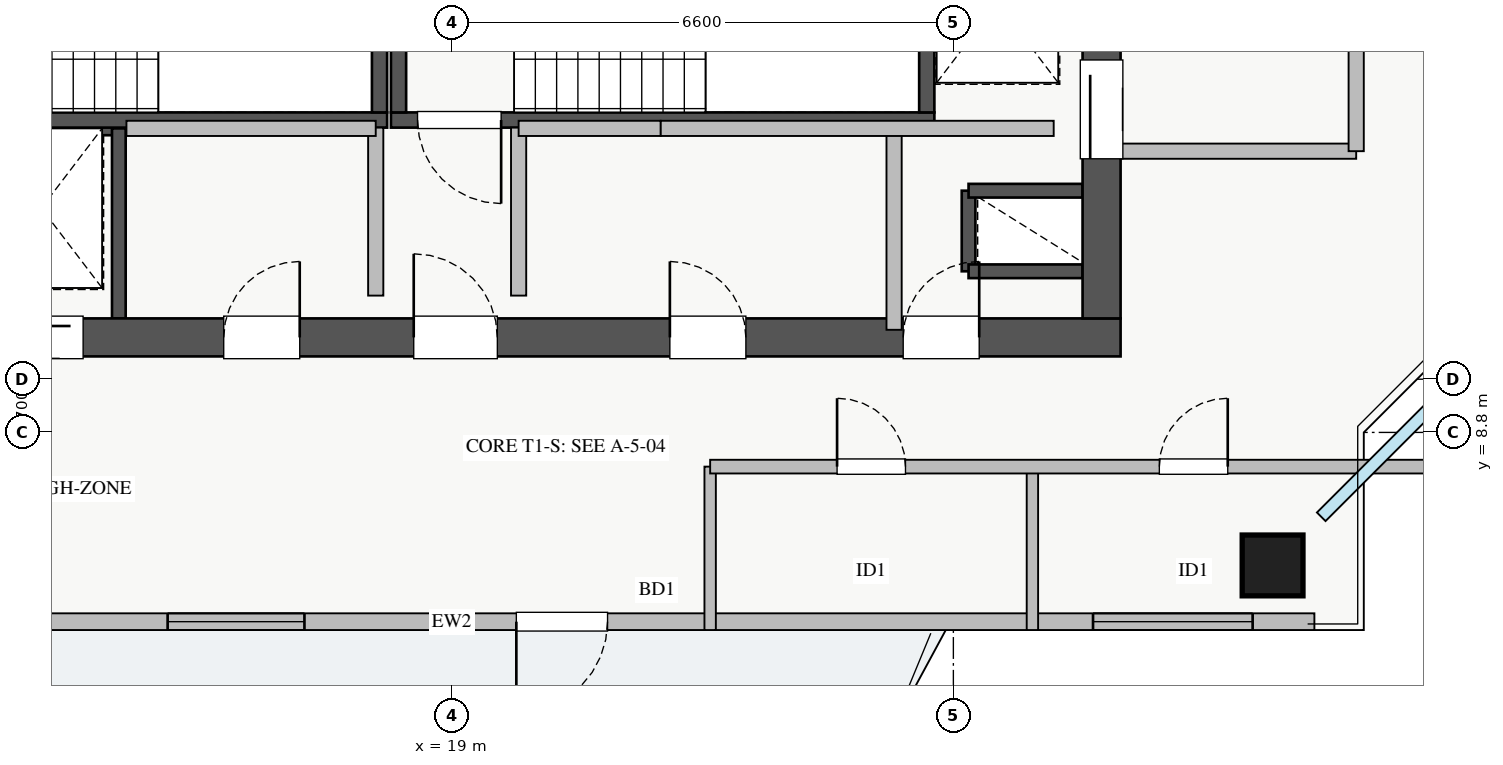
"""IFC4 building model, lengths in metres.
Left out: names, types, materials, properties, quantities, classifications, styles, units other than length and angle.
Written with IfcOpenShell. Run it as: python <this file> out.ifc"""

import sys

from ifc_helpers import new_model, si_unit, direction, frame, frame_2d, origin, origin_2d, place, context, subcontext, project, spatial, rectangle, extrude, source, transform, mapped, element, fill, save


model = new_model("IFC4")
c1 = context("Model", 3, precision=1e-05, world=origin(), true_north=direction((0.0, 1.0)))
c2 = subcontext(c1, "Body", "Model", "MODEL_VIEW")
j1 = project(units=[si_unit("LENGTHUNIT", "METRE"), si_unit("PLANEANGLEUNIT", "RADIAN")], contexts=[c1])
p1 = place(None, origin())
s1 = spatial("IfcSite", under=j1, at=p1, CompositionType="ELEMENT")
p2 = place(p1, origin())
s2 = spatial("IfcBuilding", under=s1, at=p2, CompositionType="ELEMENT")
p3 = place(p2, frame((0.0, 0.0, 206.75)))
s3 = spatial("IfcBuildingStorey", under=s2, at=p3, CompositionType="ELEMENT", Elevation=206.75)
p4 = place(p3, frame((12.68, 12.8, 0.0), z_axis=(0.0, 0.0, 1.0), x_axis=(1.0, 0.0, 0.0)))
e1 = element("IfcWall", 1, at=p4, inside=s3, PredefinedType="SHEAR", context=c2, shape_type="SweptSolid", body=[
    extrude(rectangle(XDim=1.94, YDim=0.18, at=frame_2d((0.97, 0.0))), origin(), (0.0, 0.0, 1.0), 3.07),
])
p5 = place(p3, frame((14.62, 10.3, 0.0), z_axis=(0.0, 0.0, 1.0), x_axis=(0.0, 1.0, 0.0)))
e2 = element("IfcWall", 2, at=p5, inside=s3, PredefinedType="SHEAR", context=c2, shape_type="SweptSolid", body=[
    extrude(rectangle(XDim=2.5, YDim=0.18, at=frame_2d((1.25, 0.0))), origin(), (0.0, 0.0, 1.0), 3.07),
])
p6 = place(p3, frame((25.8, 10.92, 0.0), z_axis=(0.0, 0.0, 1.0), x_axis=(0.0, 1.0, 0.0)))
e3 = element("IfcWall", 3, at=p6, inside=s3, PredefinedType="SHEAR", context=c2, shape_type="SweptSolid", body=[
    extrude(rectangle(XDim=1.06, YDim=0.18, at=frame_2d((0.53, 0.0))), origin(), (0.0, 0.0, 1.0), 3.07),
])
for number, where, z_axis, x_axis in (
    (4, (25.8, 11.98, 0.0), (0.0, 0.0, 1.0), (1.0, 0.0, 0.0)),
    (5, (25.8, 10.92, 0.0), (0.0, 0.0, 1.0), (1.0, 0.0, 0.0)),
):
    element("IfcWall", number, at=place(p3, frame(where, z_axis=z_axis, x_axis=x_axis)), inside=s3, PredefinedType="SHEAR", context=c2, shape_type="SweptSolid", body=[
        extrude(rectangle(XDim=1.5, YDim=0.18, at=frame_2d((0.75, 0.0))), origin(), (0.0, 0.0, 1.0), 3.07),
    ])
p7 = place(p3, frame((10.7, 12.91, 0.0), z_axis=(0.0, 0.0, 1.0), x_axis=(1.0, 0.0, 0.0)))
e6 = element("IfcWall", 6, at=p7, inside=s3, PredefinedType="SHEAR", context=c2, shape_type="SweptSolid", body=[
    extrude(rectangle(XDim=7.45, YDim=0.2, at=frame_2d((3.725, 0.0))), origin(), (0.0, 0.0, 1.0), 3.25),
])
p8 = place(p7, frame((0.35, 0.0, 0.0)))
e7 = element("IfcOpeningElement", 7, at=p8, cuts=e6, PredefinedType="OPENING", context=c2, shape_type="SweptSolid", body=[
    extrude(rectangle(XDim=1.1, YDim=2.05, at=frame_2d((0.55, 1.025))), frame((0.0, 0.11, 0.0), z_axis=(0.0, -1.0, 0.0), x_axis=(1.0, 0.0, 0.0)), (0.0, 0.0, 1.0), 0.22),
])
p9 = place(p3, frame((18.05, 13.01, 0.0), z_axis=(0.0, 0.0, 1.0), x_axis=(0.0, 1.0, 0.0)))
e8 = element("IfcWall", 8, at=p9, inside=s3, PredefinedType="SHEAR", context=c2, shape_type="SweptSolid", body=[
    extrude(rectangle(XDim=2.94, YDim=0.2, at=frame_2d((1.47, 0.0))), origin(), (0.0, 0.0, 1.0), 3.25),
])
p10 = place(p3, frame((18.2, 12.91, 0.0), z_axis=(0.0, 0.0, 1.0), x_axis=(1.0, 0.0, 0.0)))
e9 = element("IfcWall", 9, at=p10, inside=s3, PredefinedType="SHEAR", context=c2, shape_type="SweptSolid", body=[
    extrude(rectangle(XDim=7.15, YDim=0.2, at=frame_2d((3.575, 0.0))), origin(), (0.0, 0.0, 1.0), 3.25),
])
p11 = place(p10, frame((0.35, 0.0, 0.0)))
e10 = element("IfcOpeningElement", 10, at=p11, cuts=e9, PredefinedType="OPENING", context=c2, shape_type="SweptSolid", body=[
    extrude(rectangle(XDim=1.1, YDim=2.05, at=frame_2d((0.55, 1.025))), frame((0.0, 0.11, 0.0), z_axis=(0.0, -1.0, 0.0), x_axis=(1.0, 0.0, 0.0)), (0.0, 0.0, 1.0), 0.22),
])
for number, where, z_axis, x_axis in (
    (11, (18.3, 13.01, 0.0), (0.0, 0.0, 1.0), (0.0, 1.0, 0.0)),
    (12, (25.25, 13.01, 0.0), (0.0, 0.0, 1.0), (0.0, 1.0, 0.0)),
):
    element("IfcWall", number, at=place(p3, frame(where, z_axis=z_axis, x_axis=x_axis)), inside=s3, PredefinedType="SHEAR", context=c2, shape_type="SweptSolid", body=[
        extrude(rectangle(XDim=2.94, YDim=0.2, at=frame_2d((1.47, 0.0))), origin(), (0.0, 0.0, 1.0), 3.25),
    ])
p12 = place(p3, frame((10.2, 10.05, 0.0), z_axis=(0.0, 0.0, 1.0), x_axis=(1.0, 0.0, 0.0)))
e13 = element("IfcWall", 13, at=p12, inside=s3, PredefinedType="SHEAR", context=c2, shape_type="SweptSolid", body=[
    extrude(rectangle(XDim=17.6, YDim=0.5, at=frame_2d((8.8, 0.0))), origin(), (0.0, 0.0, 1.0), 3.25),
])
p13 = place(p12, frame((1.15, 0.0, 0.0)))
e14 = element("IfcOpeningElement", 14, at=p13, cuts=e13, PredefinedType="OPENING", context=c2, shape_type="SweptSolid", body=[
    extrude(rectangle(XDim=1.1, YDim=2.05, at=frame_2d((0.55, 1.025))), frame((0.0, 0.26, 0.0), z_axis=(0.0, -1.0, 0.0), x_axis=(1.0, 0.0, 0.0)), (0.0, 0.0, 1.0), 0.52),
])
p14 = place(p12, frame((8.3, 0.0, 0.0)))
e15 = element("IfcOpeningElement", 15, at=p14, cuts=e13, PredefinedType="OPENING", context=c2, shape_type="SweptSolid", body=[
    extrude(rectangle(XDim=1.1, YDim=2.05, at=frame_2d((0.55, 1.025))), frame((0.0, 0.26, 0.0), z_axis=(0.0, -1.0, 0.0), x_axis=(1.0, 0.0, 0.0)), (0.0, 0.0, 1.0), 0.52),
])
p15 = place(p12, frame((2.85, 0.0, 0.0)))
e16 = element("IfcOpeningElement", 16, at=p15, cuts=e13, PredefinedType="OPENING", context=c2, shape_type="SweptSolid", body=[
    extrude(rectangle(XDim=1.1, YDim=2.05, at=frame_2d((0.55, 1.025))), frame((0.0, 0.26, 0.0), z_axis=(0.0, -1.0, 0.0), x_axis=(1.0, 0.0, 0.0)), (0.0, 0.0, 1.0), 0.52),
])
p16 = place(p12, frame((5.8, 0.0, 0.0)))
e17 = element("IfcOpeningElement", 17, at=p16, cuts=e13, PredefinedType="OPENING", context=c2, shape_type="SweptSolid", body=[
    extrude(rectangle(XDim=1.0, YDim=2.05, at=frame_2d((0.5, 1.025))), frame((0.0, 0.26, 0.0), z_axis=(0.0, -1.0, 0.0), x_axis=(1.0, 0.0, 0.0)), (0.0, 0.0, 1.0), 0.52),
])
p17 = place(p12, frame((14.74, 0.0, 0.0)))
e18 = element("IfcOpeningElement", 18, at=p17, cuts=e13, PredefinedType="OPENING", context=c2, shape_type="SweptSolid", body=[
    extrude(rectangle(XDim=1.0, YDim=2.05, at=frame_2d((0.5, 1.025))), frame((0.0, 0.26, 0.0), z_axis=(0.0, -1.0, 0.0), x_axis=(1.0, 0.0, 0.0)), (0.0, 0.0, 1.0), 0.52),
])
p18 = place(p12, frame((11.67, 0.0, 0.0)))
e19 = element("IfcOpeningElement", 19, at=p18, cuts=e13, PredefinedType="OPENING", context=c2, shape_type="SweptSolid", body=[
    extrude(rectangle(XDim=1.0, YDim=2.05, at=frame_2d((0.5, 1.025))), frame((0.0, 0.26, 0.0), z_axis=(0.0, -1.0, 0.0), x_axis=(1.0, 0.0, 0.0)), (0.0, 0.0, 1.0), 0.52),
])
p19 = place(p3, frame((27.55, 10.3, 0.0), z_axis=(0.0, 0.0, 1.0), x_axis=(0.0, 1.0, 0.0)))
e20 = element("IfcWall", 20, at=p19, inside=s3, PredefinedType="SHEAR", context=c2, shape_type="SweptSolid", body=[
    extrude(rectangle(XDim=6.2, YDim=0.5, at=frame_2d((3.1, 0.0))), origin(), (0.0, 0.0, 1.0), 3.25),
])
p20 = place(p19, frame((2.1, 0.0, 0.0)))
e21 = element("IfcOpeningElement", 21, at=p20, cuts=e20, PredefinedType="OPENING", context=c2, shape_type="SweptSolid", body=[
    extrude(rectangle(XDim=1.3, YDim=2.05, at=frame_2d((0.65, 1.025))), frame((0.0, 0.26, 0.0), z_axis=(0.0, -1.0, 0.0), x_axis=(1.0, 0.0, 0.0)), (0.0, 0.0, 1.0), 0.52),
])
m1 = source(origin(), c2, "Body", "SweptSolid", [
    extrude(rectangle(XDim=0.8, YDim=0.8, at=origin_2d()), origin(), (0.0, 0.0, 1.0), 3.25),
])
p21 = place(p3, frame((29.8, 7.05, 0.0), z_axis=(0.0, 0.0, 1.0), x_axis=(1.0, 0.0, 0.0)))
e22 = element("IfcColumn", 22, at=p21, inside=s3, PredefinedType="COLUMN", context=c2, shape_type="MappedRepresentation", body=[
    mapped(m1, transform((0.0, 0.0, 0.0), x_axis=(1.0, 0.0, 0.0), y_axis=(0.0, 1.0, 0.0), z_axis=(0.0, 0.0, 1.0), scale=1.0)),
])
p22 = place(p3, frame((7.65, 6.31, 0.0), z_axis=(0.0, 0.0, 1.0), x_axis=(1.0, 0.0, 0.0)))
e23 = element("IfcWall", 23, at=p22, inside=s3, PredefinedType="STANDARD", context=c2, shape_type="SweptSolid", body=[
    extrude(rectangle(XDim=22.7, YDim=0.22, at=frame_2d((11.35, 0.0))), origin(), (0.0, 0.0, 1.0), 2.61),
])
p23 = place(p22, frame((12.2, 0.0, 0.0)))
e24 = element("IfcOpeningElement", 24, at=p23, cuts=e23, PredefinedType="OPENING", context=c2, shape_type="SweptSolid", body=[
    extrude(rectangle(XDim=1.2, YDim=2.1, at=frame_2d((0.6, 1.05))), frame((0.0, 0.12, 0.0), z_axis=(0.0, -1.0, 0.0), x_axis=(1.0, 0.0, 0.0)), (0.0, 0.0, 1.0), 0.24),
])
p24 = place(p22, frame((1.637, 0.0, 0.9)))
e25 = element("IfcOpeningElement", 25, at=p24, cuts=e23, PredefinedType="OPENING", context=c2, shape_type="SweptSolid", body=[
    extrude(rectangle(XDim=2.4, YDim=1.48, at=frame_2d((1.2, 0.74))), frame((0.0, 0.12, 0.0), z_axis=(0.0, -1.0, 0.0), x_axis=(1.0, 0.0, 0.0)), (0.0, 0.0, 1.0), 0.24),
])
p25 = place(p22, frame((7.612, 0.0, 0.9)))
e26 = element("IfcOpeningElement", 26, at=p25, cuts=e23, PredefinedType="OPENING", context=c2, shape_type="SweptSolid", body=[
    extrude(rectangle(XDim=1.8, YDim=1.45, at=frame_2d((0.9, 0.725))), frame((0.0, 0.12, 0.0), z_axis=(0.0, -1.0, 0.0), x_axis=(1.0, 0.0, 0.0)), (0.0, 0.0, 1.0), 0.24),
])
p26 = place(p22, frame((19.788, 0.0, 0.9)))
e27 = element("IfcOpeningElement", 27, at=p26, cuts=e23, PredefinedType="OPENING", context=c2, shape_type="SweptSolid", body=[
    extrude(rectangle(XDim=2.1, YDim=1.5, at=frame_2d((1.05, 0.75))), frame((0.0, 0.12, 0.0), z_axis=(0.0, -1.0, 0.0), x_axis=(1.0, 0.0, 0.0)), (0.0, 0.0, 1.0), 0.24),
])
p27 = place(p3, frame((27.8, 12.5, 0.0), z_axis=(0.0, 0.0, 1.0), x_axis=(1.0, 0.0, 0.0)))
e28 = element("IfcWall", 28, at=p27, inside=s3, PredefinedType="PARTITIONING", context=c2, shape_type="SweptSolid", body=[
    extrude(rectangle(XDim=3.1, YDim=0.2, at=frame_2d((1.55, 0.0))), origin(), (0.0, 0.0, 1.0), 2.265),
])
p28 = place(p3, frame((30.9, 12.5, 0.0), z_axis=(0.0, 0.0, 1.0), x_axis=(0.0, 1.0, 0.0)))
e29 = element("IfcWall", 29, at=p28, inside=s3, PredefinedType="PARTITIONING", context=c2, shape_type="SweptSolid", body=[
    extrude(rectangle(XDim=3.9, YDim=0.2, at=frame_2d((1.95, 0.0))), origin(), (0.0, 0.0, 1.0), 3.07),
])
p29 = place(p28, frame((1.4, 0.0, 0.0)))
e30 = element("IfcOpeningElement", 30, at=p29, cuts=e29, PredefinedType="OPENING", context=c2, shape_type="SweptSolid", body=[
    extrude(rectangle(XDim=1.1, YDim=2.05, at=frame_2d((0.55, 1.025))), frame((0.0, 0.11, 0.0), z_axis=(0.0, -1.0, 0.0), x_axis=(1.0, 0.0, 0.0)), (0.0, 0.0, 1.0), 0.22),
])
for number, where, z_axis, x_axis in (
    (31, (18.0, 10.6, 0.0), (0.0, 0.0, 1.0), (0.0, 1.0, 0.0)),
    (32, (19.88, 10.6, 0.0), (0.0, 0.0, 1.0), (0.0, 1.0, 0.0)),
):
    element("IfcWall", number, at=place(p3, frame(where, z_axis=z_axis, x_axis=x_axis)), inside=s3, PredefinedType="PARTITIONING", context=c2, shape_type="SweptSolid", body=[
        extrude(rectangle(XDim=2.21, YDim=0.2, at=frame_2d((1.105, 0.0))), origin(), (0.0, 0.0, 1.0), 3.07),
    ])
p30 = place(p3, frame((14.72, 12.8, 0.0), z_axis=(0.0, 0.0, 1.0), x_axis=(1.0, 0.0, 0.0)))
e33 = element("IfcWall", 33, at=p30, inside=s3, PredefinedType="PARTITIONING", context=c2, shape_type="SweptSolid", body=[
    extrude(rectangle(XDim=3.28, YDim=0.2, at=frame_2d((1.64, 0.0))), origin(), (0.0, 0.0, 1.0), 3.07),
])
p31 = place(p3, frame((24.82, 10.15, 0.0), z_axis=(0.0, 0.0, 1.0), x_axis=(0.0, 1.0, 0.0)))
e34 = element("IfcWall", 34, at=p31, inside=s3, PredefinedType="PARTITIONING", context=c2, shape_type="SweptSolid", body=[
    extrude(rectangle(XDim=2.65, YDim=0.2, at=frame_2d((1.325, 0.0))), origin(), (0.0, 0.0, 1.0), 3.07),
])
p32 = place(p3, frame((19.88, 12.8, 0.0), z_axis=(0.0, 0.0, 1.0), x_axis=(1.0, 0.0, 0.0)))
e35 = element("IfcWall", 35, at=p32, inside=s3, PredefinedType="PARTITIONING", context=c2, shape_type="SweptSolid", body=[
    extrude(rectangle(XDim=1.87, YDim=0.2, at=frame_2d((0.935, 0.0))), origin(), (0.0, 0.0, 1.0), 3.07),
])
p33 = place(p3, frame((21.75, 12.8, 0.0), z_axis=(0.0, 0.0, 1.0), x_axis=(1.0, 0.0, 0.0)))
e36 = element("IfcWall", 36, at=p33, inside=s3, PredefinedType="PARTITIONING", context=c2, shape_type="SweptSolid", body=[
    extrude(rectangle(XDim=5.17, YDim=0.2, at=frame_2d((2.585, 0.0))), origin(), (0.0, 0.0, 1.0), 3.07),
])
p34 = place(p3, frame((22.4, 6.2, 0.0), z_axis=(0.0, 0.0, 1.0), x_axis=(0.0, 1.0, 0.0)))
e37 = element("IfcWall", 37, at=p34, inside=s3, PredefinedType="PARTITIONING", context=c2, shape_type="SweptSolid", body=[
    extrude(rectangle(XDim=2.15, YDim=0.15, at=frame_2d((1.075, 0.0))), origin(), (0.0, 0.0, 1.0), 2.715),
])
p35 = place(p3, frame((26.64, 6.2, 0.0), z_axis=(0.0, 0.0, 1.0), x_axis=(0.0, 1.0, 0.0)))
e38 = element("IfcWall", 38, at=p35, inside=s3, PredefinedType="PARTITIONING", context=c2, shape_type="SweptSolid", body=[
    extrude(rectangle(XDim=2.15, YDim=0.15, at=frame_2d((1.075, 0.0))), origin(), (0.0, 0.0, 1.0), 3.07),
])
p36 = place(p3, frame((22.4, 8.35, 0.0), z_axis=(0.0, 0.0, 1.0), x_axis=(1.0, 0.0, 0.0)))
e39 = element("IfcWall", 39, at=p36, inside=s3, PredefinedType="PARTITIONING", context=c2, shape_type="SweptSolid", body=[
    extrude(rectangle(XDim=10.05, YDim=0.18, at=frame_2d((5.025, 0.0))), origin(), (0.0, 0.0, 1.0), 3.07),
])
p37 = place(p36, frame((1.67, 0.0, 0.0)))
e40 = element("IfcOpeningElement", 40, at=p37, cuts=e39, PredefinedType="OPENING", context=c2, shape_type="SweptSolid", body=[
    extrude(rectangle(XDim=0.9, YDim=2.05, at=frame_2d((0.45, 1.025))), frame((0.0, 0.1, 0.0), z_axis=(0.0, -1.0, 0.0), x_axis=(1.0, 0.0, 0.0)), (0.0, 0.0, 1.0), 0.2),
])
p38 = place(p36, frame((5.91, 0.0, 0.0)))
e41 = element("IfcOpeningElement", 41, at=p38, cuts=e39, PredefinedType="OPENING", context=c2, shape_type="SweptSolid", body=[
    extrude(rectangle(XDim=0.9, YDim=2.05, at=frame_2d((0.45, 1.025))), frame((0.0, 0.1, 0.0), z_axis=(0.0, -1.0, 0.0), x_axis=(1.0, 0.0, 0.0)), (0.0, 0.0, 1.0), 0.2),
])
m2 = source(origin(), c2, "Body", "SweptSolid", [
    extrude(rectangle(XDim=1.2, YDim=2.1, at=frame_2d((0.6, 1.05))), frame((0.0, 0.025, 0.0), z_axis=(0.0, -1.0, 0.0), x_axis=(1.0, 0.0, 0.0)), (0.0, 0.0, 1.0), 0.05),
])
p39 = place(p23, frame((1.2, 0.0, 0.0), z_axis=(0.0, 0.0, 1.0), x_axis=(-1.0, 0.0, 0.0)))
e42 = element("IfcDoor", 42, at=p39, inside=s3, OperationType="SINGLE_SWING_LEFT", PredefinedType="DOOR", context=c2, shape_type="MappedRepresentation", body=[
    mapped(m2, transform((0.0, 0.0, 0.0), x_axis=(1.0, 0.0, 0.0), y_axis=(0.0, 1.0, 0.0), z_axis=(0.0, 0.0, 1.0), scale=1.0)),
])
fill(e24, e42)
m3 = source(origin(), c2, "Body", "SweptSolid", [
    extrude(rectangle(XDim=1.8, YDim=1.45, at=frame_2d((0.9, 0.725))), frame((0.0, 0.03, 0.0), z_axis=(0.0, -1.0, 0.0), x_axis=(1.0, 0.0, 0.0)), (0.0, 0.0, 1.0), 0.06),
])
p40 = place(p25, origin())
e43 = element("IfcWindow", 43, at=p40, inside=s3, PartitioningType="DOUBLE_PANEL_VERTICAL", PredefinedType="WINDOW", context=c2, shape_type="MappedRepresentation", body=[
    mapped(m3, transform((0.0, 0.0, 0.0), x_axis=(1.0, 0.0, 0.0), y_axis=(0.0, 1.0, 0.0), z_axis=(0.0, 0.0, 1.0), scale=1.0)),
])
fill(e26, e43)
m4 = source(origin(), c2, "Body", "SweptSolid", [
    extrude(rectangle(XDim=2.1, YDim=1.5, at=frame_2d((1.05, 0.75))), frame((0.0, 0.03, 0.0), z_axis=(0.0, -1.0, 0.0), x_axis=(1.0, 0.0, 0.0)), (0.0, 0.0, 1.0), 0.06),
])
p41 = place(p26, origin())
e44 = element("IfcWindow", 44, at=p41, inside=s3, PartitioningType="TRIPLE_PANEL_VERTICAL", PredefinedType="WINDOW", context=c2, shape_type="MappedRepresentation", body=[
    mapped(m4, transform((0.0, 0.0, 0.0), x_axis=(1.0, 0.0, 0.0), y_axis=(0.0, 1.0, 0.0), z_axis=(0.0, 0.0, 1.0), scale=1.0)),
])
fill(e27, e44)
m5 = source(origin(), c2, "Body", "SweptSolid", [
    extrude(rectangle(XDim=1.3, YDim=2.05, at=frame_2d((0.65, 1.025))), frame((0.0, 0.025, 0.0), z_axis=(0.0, -1.0, 0.0), x_axis=(1.0, 0.0, 0.0)), (0.0, 0.0, 1.0), 0.05),
])
p42 = place(p20, origin())
e45 = element("IfcDoor", 45, at=p42, inside=s3, OperationType="SLIDING_TO_RIGHT", PredefinedType="DOOR", context=c2, shape_type="MappedRepresentation", body=[
    mapped(m5, transform((0.0, 0.0, 0.0), x_axis=(1.0, 0.0, 0.0), y_axis=(0.0, 1.0, 0.0), z_axis=(0.0, 0.0, 1.0), scale=1.0)),
])
fill(e21, e45)
m6 = source(origin(), c2, "Body", "SweptSolid", [
    extrude(rectangle(XDim=1.1, YDim=2.05, at=frame_2d((0.55, 1.025))), frame((0.0, 0.025, 0.0), z_axis=(0.0, -1.0, 0.0), x_axis=(1.0, 0.0, 0.0)), (0.0, 0.0, 1.0), 0.05),
])
p43 = place(p14, origin())
e46 = element("IfcDoor", 46, at=p43, inside=s3, OperationType="SINGLE_SWING_LEFT", PredefinedType="DOOR", context=c2, shape_type="MappedRepresentation", body=[
    mapped(m6, transform((0.0, 0.0, 0.0), x_axis=(1.0, 0.0, 0.0), y_axis=(0.0, 1.0, 0.0), z_axis=(0.0, 0.0, 1.0), scale=1.0)),
])
fill(e15, e46)
p44 = place(p11, frame((1.1, 0.0, 0.0), z_axis=(0.0, 0.0, 1.0), x_axis=(-1.0, 0.0, 0.0)))
e47 = element("IfcDoor", 47, at=p44, inside=s3, OperationType="SINGLE_SWING_RIGHT", PredefinedType="DOOR", context=c2, shape_type="MappedRepresentation", body=[
    mapped(m6, transform((0.0, 0.0, 0.0), x_axis=(1.0, 0.0, 0.0), y_axis=(0.0, 1.0, 0.0), z_axis=(0.0, 0.0, 1.0), scale=1.0)),
])
fill(e10, e47)
p45 = place(p15, origin())
e48 = element("IfcDoor", 48, at=p45, inside=s3, OperationType="SLIDING_TO_RIGHT", PredefinedType="DOOR", context=c2, shape_type="MappedRepresentation", body=[
    mapped(m6, transform((0.0, 0.0, 0.0), x_axis=(1.0, 0.0, 0.0), y_axis=(0.0, 1.0, 0.0), z_axis=(0.0, 0.0, 1.0), scale=1.0)),
])
fill(e16, e48)
m7 = source(origin(), c2, "Body", "SweptSolid", [
    extrude(rectangle(XDim=1.0, YDim=2.05, at=frame_2d((0.5, 1.025))), frame((0.0, 0.025, 0.0), z_axis=(0.0, -1.0, 0.0), x_axis=(1.0, 0.0, 0.0)), (0.0, 0.0, 1.0), 0.05),
])
p46 = place(p16, origin())
e49 = element("IfcDoor", 49, at=p46, inside=s3, OperationType="SINGLE_SWING_RIGHT", PredefinedType="DOOR", context=c2, shape_type="MappedRepresentation", body=[
    mapped(m7, transform((0.0, 0.0, 0.0), x_axis=(1.0, 0.0, 0.0), y_axis=(0.0, 1.0, 0.0), z_axis=(0.0, 0.0, 1.0), scale=1.0)),
])
fill(e17, e49)
p47 = place(p17, origin())
e50 = element("IfcDoor", 50, at=p47, inside=s3, OperationType="SINGLE_SWING_RIGHT", PredefinedType="DOOR", context=c2, shape_type="MappedRepresentation", body=[
    mapped(m7, transform((0.0, 0.0, 0.0), x_axis=(1.0, 0.0, 0.0), y_axis=(0.0, 1.0, 0.0), z_axis=(0.0, 0.0, 1.0), scale=1.0)),
])
fill(e18, e50)
p48 = place(p18, origin())
e51 = element("IfcDoor", 51, at=p48, inside=s3, OperationType="SINGLE_SWING_LEFT", PredefinedType="DOOR", context=c2, shape_type="MappedRepresentation", body=[
    mapped(m7, transform((0.0, 0.0, 0.0), x_axis=(1.0, 0.0, 0.0), y_axis=(0.0, 1.0, 0.0), z_axis=(0.0, 0.0, 1.0), scale=1.0)),
])
fill(e19, e51)
m8 = source(origin(), c2, "Body", "SweptSolid", [
    extrude(rectangle(XDim=0.9, YDim=2.05, at=frame_2d((0.45, 1.025))), frame((0.0, 0.025, 0.0), z_axis=(0.0, -1.0, 0.0), x_axis=(1.0, 0.0, 0.0)), (0.0, 0.0, 1.0), 0.05),
])
p49 = place(p37, origin())
e52 = element("IfcDoor", 52, at=p49, inside=s3, OperationType="SINGLE_SWING_LEFT", PredefinedType="DOOR", context=c2, shape_type="MappedRepresentation", body=[
    mapped(m8, transform((0.0, 0.0, 0.0), x_axis=(1.0, 0.0, 0.0), y_axis=(0.0, 1.0, 0.0), z_axis=(0.0, 0.0, 1.0), scale=1.0)),
])
fill(e40, e52)
p50 = place(p38, origin())
e53 = element("IfcDoor", 53, at=p50, inside=s3, OperationType="SINGLE_SWING_RIGHT", PredefinedType="DOOR", context=c2, shape_type="MappedRepresentation", body=[
    mapped(m8, transform((0.0, 0.0, 0.0), x_axis=(1.0, 0.0, 0.0), y_axis=(0.0, 1.0, 0.0), z_axis=(0.0, 0.0, 1.0), scale=1.0)),
])
fill(e41, e53)
save(model, sys.argv[1])
